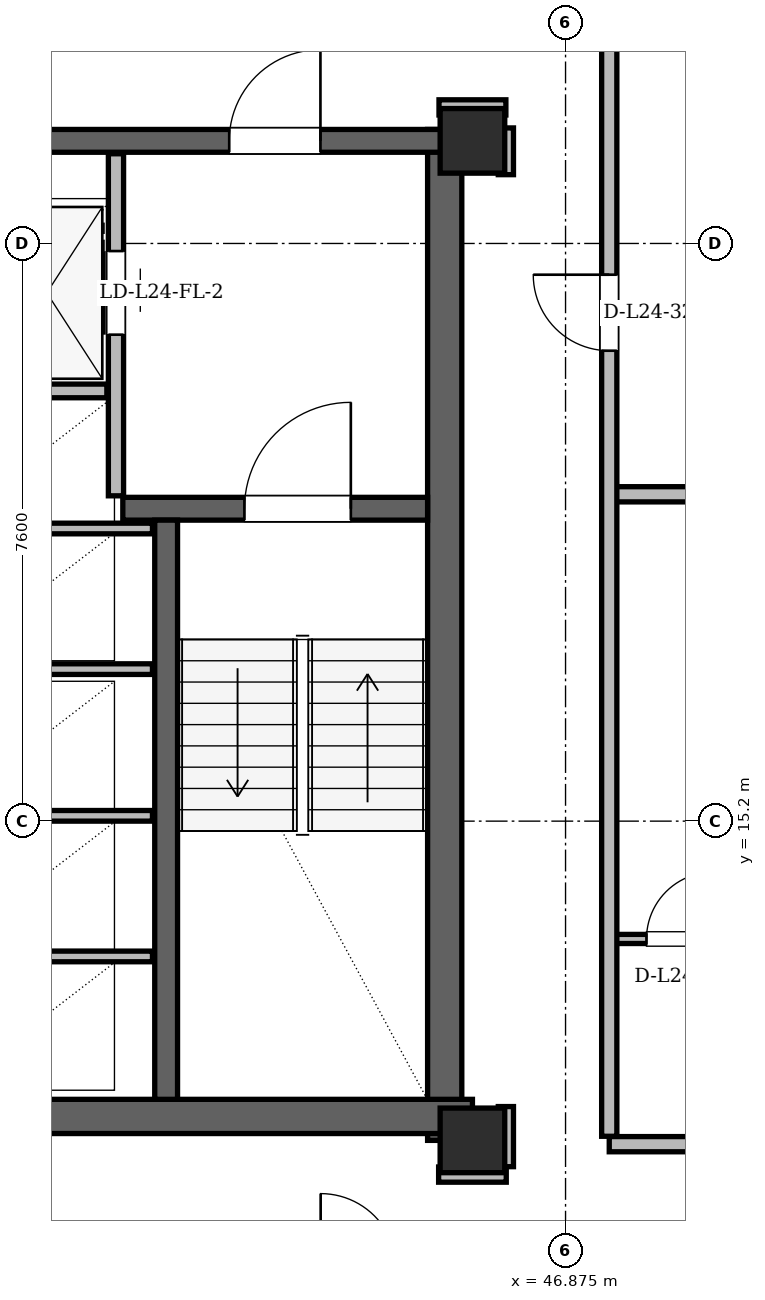
"""IFC4 building model, lengths in metres.
Left out: names, types, materials, properties, quantities, classifications, styles, units other than length and angle.
Written with IfcOpenShell. Run it as: python <this file> out.ifc"""

import sys

from ifc_helpers import new_model, si_unit, direction, frame, frame_2d, origin, origin_2d, place, context, subcontext, project, spatial, rectangle, hollow_rectangle, extrude, element, fill, save


model = new_model("IFC4")
c1 = context("Model", 3, precision=1e-05, world=origin(), true_north=direction((0.0, 1.0)))
c2 = subcontext(c1, "Body", "Model", "MODEL_VIEW")
j1 = project(units=[si_unit("LENGTHUNIT", "METRE"), si_unit("PLANEANGLEUNIT", "RADIAN")], contexts=[c1])
p1 = place(None, origin())
s1 = spatial("IfcSite", under=j1, at=p1, CompositionType="ELEMENT")
p2 = place(p1, origin())
s2 = spatial("IfcBuilding", under=s1, at=p2, CompositionType="ELEMENT")
p3 = place(p2, frame((0.0, 0.0, 93.3)))
s3 = spatial("IfcBuildingStorey", under=s2, at=p3, CompositionType="ELEMENT", Elevation=93.3)
for number, where, z_axis, x_axis in (
    (1, (45.65, 11.0, 0.0), (0.0, 0.0, 1.0), (1.0, 0.0, 0.0)),
    (2, (45.65, 24.15, 0.0), (0.0, 0.0, 1.0), (1.0, 0.0, 0.0)),
):
    element("IfcColumn", number, at=place(p3, frame(where, z_axis=z_axis, x_axis=x_axis)), inside=s3, PredefinedType="COLUMN", context=c2, shape_type="SweptSolid", body=[
        extrude(hollow_rectangle(XDim=0.85, YDim=0.85, WallThickness=0.07, at=origin_2d()), origin(), (0.0, 0.0, 1.0), 3.6),
    ])
p4 = place(p3, frame((45.285, 11.0, 0.0), z_axis=(0.0, 0.0, 1.0), x_axis=(0.0, 1.0, 0.0)))
e3 = element("IfcWall", 3, at=p4, inside=s3, PredefinedType="SHEAR", context=c2, shape_type="SweptSolid", body=[
    extrude(rectangle(XDim=13.3, YDim=0.45, at=frame_2d((6.65, 0.0))), origin(), (0.0, 0.0, 1.0), 3.36),
])
p5 = place(p3, frame((38.55, 11.315, 0.0), z_axis=(0.0, 0.0, 1.0), x_axis=(1.0, 0.0, 0.0)))
e4 = element("IfcWall", 4, at=p5, inside=s3, PredefinedType="SHEAR", context=c2, shape_type="SweptSolid", body=[
    extrude(rectangle(XDim=7.1, YDim=0.45, at=frame_2d((3.55, 0.0))), origin(), (0.0, 0.0, 1.0), 3.36),
])
p6 = place(p3, frame((29.65, 24.15, 0.0), z_axis=(0.0, 0.0, 1.0), x_axis=(1.0, 0.0, 0.0)))
e5 = element("IfcWall", 5, at=p6, inside=s3, PredefinedType="SHEAR", context=c2, shape_type="SweptSolid", body=[
    extrude(rectangle(XDim=15.7, YDim=0.3, at=frame_2d((7.85, 0.0))), origin(), (0.0, 0.0, 1.0), 3.36),
])
p7 = place(p6, frame((1.7, 0.0, 0.0)))
e6 = element("IfcOpeningElement", 6, at=p7, cuts=e5, PredefinedType="OPENING", context=c2, shape_type="SweptSolid", body=[
    extrude(rectangle(XDim=1.2, YDim=2.2, at=frame_2d((0.6, 1.1))), frame((0.0, 0.15, 0.0), z_axis=(0.0, -1.0, 0.0), x_axis=(1.0, 0.0, 0.0)), (0.0, 0.0, 1.0), 0.3),
])
p8 = place(p6, frame((12.8, 0.0, 0.0)))
e7 = element("IfcOpeningElement", 7, at=p8, cuts=e5, PredefinedType="OPENING", context=c2, shape_type="SweptSolid", body=[
    extrude(rectangle(XDim=1.2, YDim=2.2, at=frame_2d((0.6, 1.1))), frame((0.0, 0.15, 0.0), z_axis=(0.0, -1.0, 0.0), x_axis=(1.0, 0.0, 0.0)), (0.0, 0.0, 1.0), 0.3),
])
p9 = place(p6, frame((6.55, 0.0, 0.0)))
e8 = element("IfcOpeningElement", 8, at=p9, cuts=e5, PredefinedType="OPENING", context=c2, shape_type="SweptSolid", body=[
    extrude(rectangle(XDim=0.9, YDim=2.05, at=frame_2d((0.45, 1.025))), frame((0.0, 0.15, 0.0), z_axis=(0.0, -1.0, 0.0), x_axis=(1.0, 0.0, 0.0)), (0.0, 0.0, 1.0), 0.3),
])
p10 = place(p6, frame((8.45, 0.0, 0.0)))
e9 = element("IfcOpeningElement", 9, at=p10, cuts=e5, PredefinedType="OPENING", context=c2, shape_type="SweptSolid", body=[
    extrude(rectangle(XDim=0.9, YDim=2.05, at=frame_2d((0.45, 1.025))), frame((0.0, 0.15, 0.0), z_axis=(0.0, -1.0, 0.0), x_axis=(1.0, 0.0, 0.0)), (0.0, 0.0, 1.0), 0.3),
])
p11 = place(p3, frame((41.05, 19.31, 0.0), z_axis=(0.0, 0.0, 1.0), x_axis=(1.0, 0.0, 0.0)))
e10 = element("IfcWall", 10, at=p11, inside=s3, PredefinedType="SHEAR", context=c2, shape_type="SweptSolid", body=[
    extrude(rectangle(XDim=4.01, YDim=0.3, at=frame_2d((2.005, 0.0))), origin(), (0.0, 0.0, 1.0), 3.36),
])
p12 = place(p11, frame((1.6, 0.0, 0.0)))
e11 = element("IfcOpeningElement", 11, at=p12, cuts=e10, PredefinedType="OPENING", context=c2, shape_type="SweptSolid", body=[
    extrude(rectangle(XDim=1.4, YDim=2.2, at=frame_2d((0.7, 1.1))), frame((0.0, 0.15, 0.0), z_axis=(0.0, -1.0, 0.0), x_axis=(1.0, 0.0, 0.0)), (0.0, 0.0, 1.0), 0.3),
])
p13 = place(p3, frame((41.62, 11.54, 0.0), z_axis=(0.0, 0.0, 1.0), x_axis=(0.0, 1.0, 0.0)))
e12 = element("IfcWall", 12, at=p13, inside=s3, PredefinedType="SHEAR", context=c2, shape_type="SweptSolid", body=[
    extrude(rectangle(XDim=7.62, YDim=0.3, at=frame_2d((3.81, 0.0))), origin(), (0.0, 0.0, 1.0), 3.36),
])
p14 = place(p3, frame((40.96, 19.48, 0.0), z_axis=(0.0, 0.0, 1.0), x_axis=(0.0, 1.0, 0.0)))
e13 = element("IfcWall", 13, at=p14, inside=s3, PredefinedType="PARTITIONING", context=c2, shape_type="SweptSolid", body=[
    extrude(rectangle(XDim=4.5, YDim=0.2, at=frame_2d((2.25, 0.0))), origin(), (0.0, 0.0, 1.0), 2.4),
])
p15 = place(p14, frame((2.12, 0.0, 0.0)))
e14 = element("IfcOpeningElement", 14, at=p15, cuts=e13, PredefinedType="OPENING", context=c2, shape_type="SweptSolid", body=[
    extrude(rectangle(XDim=1.1, YDim=2.2, at=frame_2d((0.55, 1.1))), frame((0.0, 0.1, 0.0), z_axis=(0.0, -1.0, 0.0), x_axis=(1.0, 0.0, 0.0)), (0.0, 0.0, 1.0), 0.2),
])
p16 = place(p3, frame((39.26, 20.86, 0.0), z_axis=(0.0, 0.0, 1.0), x_axis=(1.0, 0.0, 0.0)))
e15 = element("IfcWall", 15, at=p16, inside=s3, PredefinedType="PARTITIONING", context=c2, shape_type="SweptSolid", body=[
    extrude(rectangle(XDim=1.58, YDim=0.18, at=frame_2d((0.79, 0.0))), origin(), (0.0, 0.0, 1.0), 3.36),
])
for number, where, z_axis, x_axis in (
    (16, (38.78, 13.42, 0.0), (0.0, 0.0, 1.0), (1.0, 0.0, 0.0)),
    (17, (38.78, 15.27, 0.0), (0.0, 0.0, 1.0), (1.0, 0.0, 0.0)),
    (18, (38.78, 17.2, 0.0), (0.0, 0.0, 1.0), (1.0, 0.0, 0.0)),
    (19, (38.78, 19.05, 0.0), (0.0, 0.0, 1.0), (1.0, 0.0, 0.0)),
):
    element("IfcWall", number, at=place(p3, frame(where, z_axis=z_axis, x_axis=x_axis)), inside=s3, PredefinedType="PARTITIONING", context=c2, shape_type="SweptSolid", body=[
        extrude(rectangle(XDim=2.66, YDim=0.14, at=frame_2d((1.33, 0.0))), origin(), (0.0, 0.0, 1.0), 3.36),
    ])
p17 = place(p3, frame((45.205, 10.55, 0.0), z_axis=(0.0, 0.0, 1.0), x_axis=(1.0, 0.0, 0.0)))
e20 = element("IfcWall", 20, at=p17, inside=s3, PredefinedType="PARTITIONING", context=c2, shape_type="SweptSolid", body=[
    extrude(rectangle(XDim=0.89, YDim=0.2, at=frame_2d((0.445, 0.0))), origin(), (0.0, 0.0, 1.0), 3.36),
])
p18 = place(p3, frame((47.45, 10.95, 0.0), z_axis=(0.0, 0.0, 1.0), x_axis=(1.0, 0.0, 0.0)))
e21 = element("IfcWall", 21, at=p18, inside=s3, PredefinedType="PARTITIONING", context=c2, shape_type="SweptSolid", body=[
    extrude(rectangle(XDim=8.35, YDim=0.2, at=frame_2d((4.175, 0.0))), origin(), (0.0, 0.0, 1.0), 3.36),
])
p19 = place(p3, frame((47.4, 13.65, 0.0), z_axis=(0.0, 0.0, 1.0), x_axis=(1.0, 0.0, 0.0)))
e22 = element("IfcWall", 22, at=p19, inside=s3, PredefinedType="PARTITIONING", context=c2, shape_type="SweptSolid", body=[
    extrude(rectangle(XDim=13.01, YDim=0.12, at=frame_2d((6.505, 0.0))), origin(), (0.0, 0.0, 1.0), 2.814),
])
p20 = place(p19, frame((0.54, 0.0, 0.0)))
e23 = element("IfcOpeningElement", 23, at=p20, cuts=e22, PredefinedType="OPENING", context=c2, shape_type="SweptSolid", body=[
    extrude(rectangle(XDim=0.88, YDim=2.08, at=frame_2d((0.44, 1.04))), frame((0.0, 0.06, 0.0), z_axis=(0.0, -1.0, 0.0), x_axis=(1.0, 0.0, 0.0)), (0.0, 0.0, 1.0), 0.12),
])
p21 = place(p19, frame((2.49, 0.0, 0.0)))
e24 = element("IfcOpeningElement", 24, at=p21, cuts=e22, PredefinedType="OPENING", context=c2, shape_type="SweptSolid", body=[
    extrude(rectangle(XDim=0.95, YDim=2.1, at=frame_2d((0.475, 1.05))), frame((0.0, 0.06, 0.0), z_axis=(0.0, -1.0, 0.0), x_axis=(1.0, 0.0, 0.0)), (0.0, 0.0, 1.0), 0.12),
])
p22 = place(p19, frame((8.146, 0.0, 0.0)))
e25 = element("IfcOpeningElement", 25, at=p22, cuts=e22, PredefinedType="OPENING", context=c2, shape_type="SweptSolid", body=[
    extrude(rectangle(XDim=0.92, YDim=2.12, at=frame_2d((0.46, 1.06))), frame((0.0, 0.06, 0.0), z_axis=(0.0, -1.0, 0.0), x_axis=(1.0, 0.0, 0.0)), (0.0, 0.0, 1.0), 0.12),
])
p23 = place(p3, frame((47.45, 19.5, 0.0), z_axis=(0.0, 0.0, 1.0), x_axis=(1.0, 0.0, 0.0)))
e26 = element("IfcWall", 26, at=p23, inside=s3, PredefinedType="PARTITIONING", context=c2, shape_type="SweptSolid", body=[
    extrude(rectangle(XDim=9.814, YDim=0.2, at=frame_2d((4.907, 0.0))), origin(), (0.0, 0.0, 1.0), 3.36),
])
p24 = place(p3, frame((45.21, 24.59, 0.0), z_axis=(0.0, 0.0, 1.0), x_axis=(1.0, 0.0, 0.0)))
e27 = element("IfcWall", 27, at=p24, inside=s3, PredefinedType="PARTITIONING", context=c2, shape_type="SweptSolid", body=[
    extrude(rectangle(XDim=0.88, YDim=0.2, at=frame_2d((0.44, 0.0))), origin(), (0.0, 0.0, 1.0), 2.814),
])
p25 = place(p3, frame((46.09, 10.654, 0.0), z_axis=(0.0, 0.0, 1.0), x_axis=(0.0, 1.0, 0.0)))
e28 = element("IfcWall", 28, at=p25, inside=s3, PredefinedType="PARTITIONING", context=c2, shape_type="SweptSolid", body=[
    extrude(rectangle(XDim=0.791, YDim=0.2, at=frame_2d((0.396, 0.0))), origin(), (0.0, 0.0, 1.0), 2.814),
])
p26 = place(p3, frame((46.09, 23.705, 0.0), z_axis=(0.0, 0.0, 1.0), x_axis=(0.0, 1.0, 0.0)))
e29 = element("IfcWall", 29, at=p26, inside=s3, PredefinedType="PARTITIONING", context=c2, shape_type="SweptSolid", body=[
    extrude(rectangle(XDim=0.615, YDim=0.2, at=frame_2d((0.308, 0.0))), origin(), (0.0, 0.0, 1.0), 2.946),
])
p27 = place(p3, frame((47.45, 11.054, 0.0), z_axis=(0.0, 0.0, 1.0), x_axis=(0.0, 1.0, 0.0)))
e30 = element("IfcWall", 30, at=p27, inside=s3, PredefinedType="PARTITIONING", context=c2, shape_type="SweptSolid", body=[
    extrude(rectangle(XDim=25.444, YDim=0.2, at=frame_2d((12.722, 0.0))), origin(), (0.0, 0.0, 1.0), 2.578),
])
p28 = place(p27, frame((10.335, 0.0, 0.0)))
e31 = element("IfcOpeningElement", 31, at=p28, cuts=e30, PredefinedType="OPENING", context=c2, shape_type="SweptSolid", body=[
    extrude(rectangle(XDim=1.0, YDim=2.18, at=frame_2d((0.5, 1.09))), frame((0.0, 0.1, 0.0), z_axis=(0.0, -1.0, 0.0), x_axis=(1.0, 0.0, 0.0)), (0.0, 0.0, 1.0), 0.2),
])
p29 = place(p15, origin())
e32 = element("IfcDoor", 32, at=p29, inside=s3, OperationType="SLIDING_TO_RIGHT", PredefinedType="DOOR", context=c2, shape_type="SweptSolid", body=[
    extrude(rectangle(XDim=1.1, YDim=2.2, at=frame_2d((0.55, 1.1))), frame((0.0, 0.025, 0.0), z_axis=(0.0, -1.0, 0.0), x_axis=(1.0, 0.0, 0.0)), (0.0, 0.0, 1.0), 0.05),
])
fill(e14, e32)
p30 = place(p12, origin())
e33 = element("IfcDoor", 33, at=p30, inside=s3, OperationType="SINGLE_SWING_RIGHT", PredefinedType="DOOR", context=c2, shape_type="SweptSolid", body=[
    extrude(rectangle(XDim=1.4, YDim=2.2, at=frame_2d((0.7, 1.1))), frame((0.0, 0.025, 0.0), z_axis=(0.0, -1.0, 0.0), x_axis=(1.0, 0.0, 0.0)), (0.0, 0.0, 1.0), 0.05),
])
fill(e11, e33)
p31 = place(p8, origin())
e34 = element("IfcDoor", 34, at=p31, inside=s3, OperationType="SINGLE_SWING_RIGHT", PredefinedType="DOOR", context=c2, shape_type="SweptSolid", body=[
    extrude(rectangle(XDim=1.2, YDim=2.2, at=frame_2d((0.6, 1.1))), frame((0.0, 0.025, 0.0), z_axis=(0.0, -1.0, 0.0), x_axis=(1.0, 0.0, 0.0)), (0.0, 0.0, 1.0), 0.05),
])
fill(e7, e34)
p32 = place(p20, origin())
e35 = element("IfcDoor", 35, at=p32, inside=s3, OperationType="SINGLE_SWING_RIGHT", PredefinedType="DOOR", context=c2, shape_type="SweptSolid", body=[
    extrude(rectangle(XDim=0.88, YDim=2.08, at=frame_2d((0.44, 1.04))), frame((0.0, 0.025, 0.0), z_axis=(0.0, -1.0, 0.0), x_axis=(1.0, 0.0, 0.0)), (0.0, 0.0, 1.0), 0.05),
])
fill(e23, e35)
p33 = place(p28, origin())
e36 = element("IfcDoor", 36, at=p33, inside=s3, OperationType="SINGLE_SWING_RIGHT", PredefinedType="DOOR", context=c2, shape_type="SweptSolid", body=[
    extrude(rectangle(XDim=1.0, YDim=2.18, at=frame_2d((0.5, 1.09))), frame((0.0, 0.025, 0.0), z_axis=(0.0, -1.0, 0.0), x_axis=(1.0, 0.0, 0.0)), (0.0, 0.0, 1.0), 0.05),
])
fill(e31, e36)
save(model, sys.argv[1])
